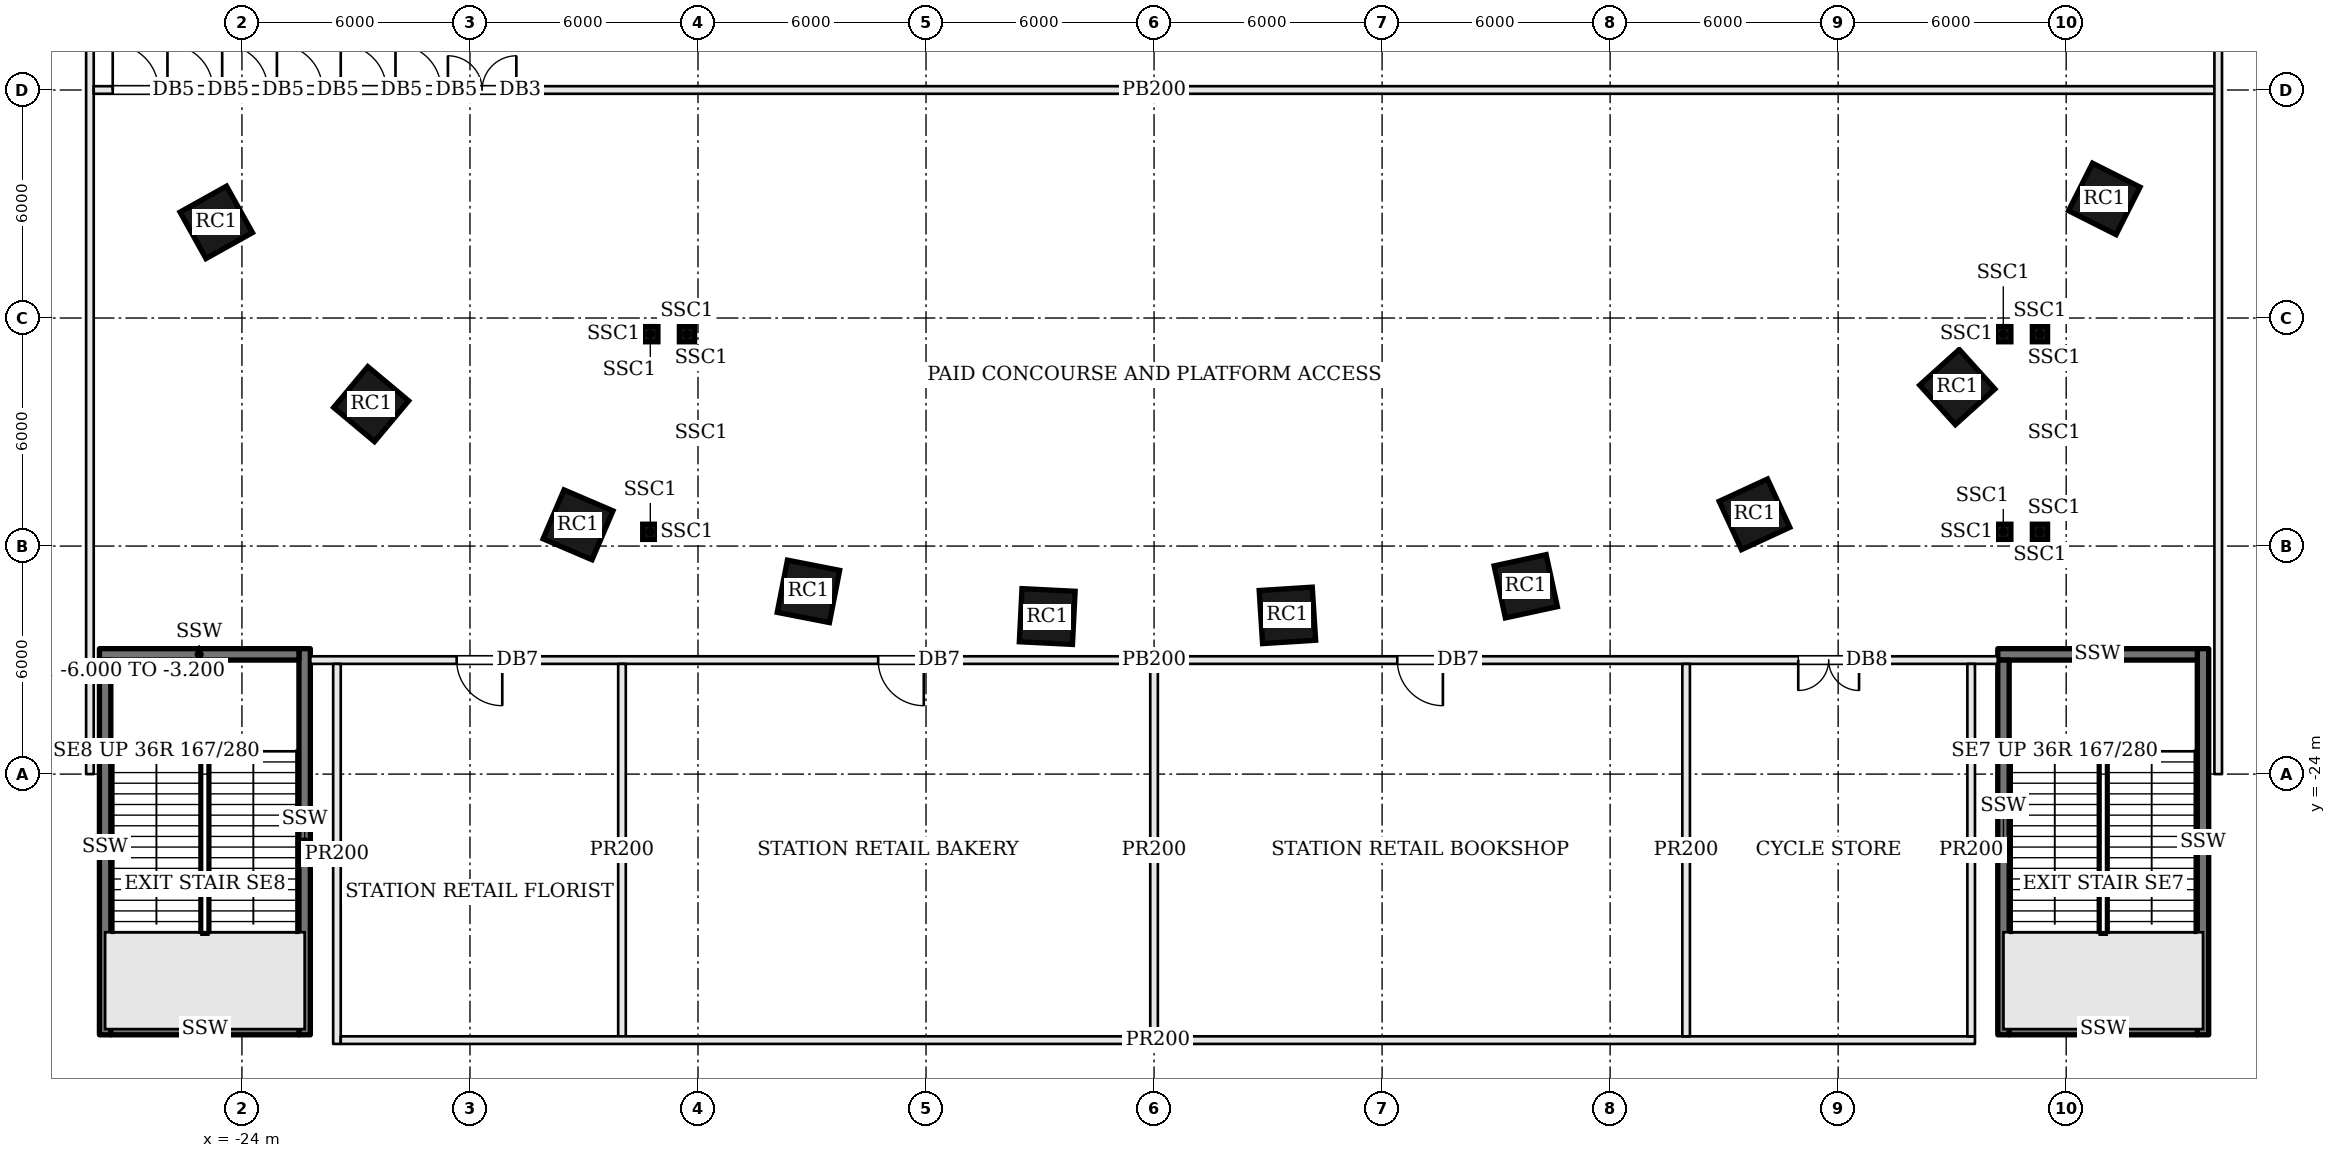
"""IFC4 building model, lengths in metres.
Left out: names, types, materials, properties, quantities, classifications, styles, units other than length and angle.
Written with IfcOpenShell. Run it as: python <this file> out.ifc"""

import sys

from ifc_helpers import new_model, si_unit, direction, frame, frame_2d, origin, origin_2d, place, context, subcontext, project, spatial, rectangle, extrude, element, fill, save


model = new_model("IFC4")
c1 = context("Model", 3, precision=1e-05, world=origin(), true_north=direction((0.0, 1.0)))
c2 = subcontext(c1, "Body", "Model", "MODEL_VIEW")
j1 = project(units=[si_unit("LENGTHUNIT", "METRE"), si_unit("PLANEANGLEUNIT", "RADIAN")], contexts=[c1])
p1 = place(None, origin())
s1 = spatial("IfcSite", under=j1, at=p1, CompositionType="ELEMENT")
p2 = place(p1, origin())
s2 = spatial("IfcBuilding", under=s1, at=p2, CompositionType="ELEMENT")
p3 = place(p2, frame((0.0, 0.0, -6.0)))
s3 = spatial("IfcBuildingStorey", under=s2, at=p3, CompositionType="ELEMENT", Elevation=-6.0)
for number, where, z_axis, x_axis in (
    (1, (-24.676, -9.483, 0.0), (0.0, 0.0, 1.0), (0.487, -0.873, 0.0)),
    (2, (-20.6, -14.266, 0.0), (0.0, 0.0, 1.0), (0.767, -0.641, 0.0)),
    (3, (-15.157, -17.441, 0.0), (0.0, 0.0, 1.0), (0.919, -0.394, 0.0)),
    (4, (-9.094, -19.192, 0.0), (0.0, 0.0, 1.0), (0.981, -0.192, 0.0)),
    (5, (-2.811, -19.854, 0.0), (0.0, 0.0, 1.0), (0.999, -0.05, 0.0)),
    (6, (3.509, -19.824, 0.0), (0.0, 0.0, 1.0), (0.998, 0.063, 0.0)),
    (7, (9.78, -19.058, 0.0), (0.0, 0.0, 1.0), (0.977, 0.211, 0.0)),
    (8, (15.799, -17.165, 0.0), (0.0, 0.0, 1.0), (0.908, 0.419, 0.0)),
    (9, (21.135, -13.817, 0.0), (0.0, 0.0, 1.0), (0.743, 0.67, 0.0)),
    (10, (25.003, -8.866, 0.0), (0.0, 0.0, 1.0), (0.45, 0.893, 0.0)),
):
    element("IfcColumn", number, at=place(p3, frame(where, z_axis=z_axis, x_axis=x_axis)), inside=s3, PredefinedType="COLUMN", context=c2, shape_type="SweptSolid", body=[
        extrude(rectangle(XDim=1.4, YDim=1.4, at=origin_2d()), origin(), (0.0, 0.0, 1.0), 6.0),
    ])
p4 = place(p3, frame((-28.0, -24.0, 0.0), z_axis=(0.0, 0.0, 1.0), x_axis=(0.0, 1.0, 0.0)))
e11 = element("IfcWall", 11, at=p4, inside=s3, PredefinedType="PARTITIONING", context=c2, shape_type="SweptSolid", body=[
    extrude(rectangle(XDim=48.0, YDim=0.2, at=frame_2d((24.0, 0.0))), origin(), (0.0, 0.0, 1.0), 5.148),
])
p5 = place(p4, frame((22.259, 0.0, 0.0)))
e12 = element("IfcOpeningElement", 12, at=p5, cuts=e11, PredefinedType="OPENING", context=c2, shape_type="SweptSolid", body=[
    extrude(rectangle(XDim=1.8, YDim=2.1, at=frame_2d((0.9, 1.05))), frame((0.0, 0.11, 0.0), z_axis=(0.0, -1.0, 0.0), x_axis=(1.0, 0.0, 0.0)), (0.0, 0.0, 1.0), 0.22),
])
p6 = place(p3, frame((-27.9, -6.0, 0.0), z_axis=(0.0, 0.0, 1.0), x_axis=(1.0, 0.0, 0.0)))
e13 = element("IfcWall", 13, at=p6, inside=s3, PredefinedType="PARTITIONING", context=c2, shape_type="SweptSolid", body=[
    extrude(rectangle(XDim=55.8, YDim=0.2, at=frame_2d((27.9, 0.0))), origin(), (0.0, 0.0, 1.0), 5.148),
])
p7 = place(p6, frame((0.5, 0.0, 0.0)))
e14 = element("IfcOpeningElement", 14, at=p7, cuts=e13, PredefinedType="OPENING", context=c2, shape_type="SweptSolid", body=[
    extrude(rectangle(XDim=1.2, YDim=2.1, at=frame_2d((0.6, 1.05))), frame((0.0, 0.11, 0.0), z_axis=(0.0, -1.0, 0.0), x_axis=(1.0, 0.0, 0.0)), (0.0, 0.0, 1.0), 0.22),
])
p8 = place(p6, frame((1.94, 0.0, 0.0)))
e15 = element("IfcOpeningElement", 15, at=p8, cuts=e13, PredefinedType="OPENING", context=c2, shape_type="SweptSolid", body=[
    extrude(rectangle(XDim=1.2, YDim=2.1, at=frame_2d((0.6, 1.05))), frame((0.0, 0.11, 0.0), z_axis=(0.0, -1.0, 0.0), x_axis=(1.0, 0.0, 0.0)), (0.0, 0.0, 1.0), 0.22),
])
p9 = place(p6, frame((3.38, 0.0, 0.0)))
e16 = element("IfcOpeningElement", 16, at=p9, cuts=e13, PredefinedType="OPENING", context=c2, shape_type="SweptSolid", body=[
    extrude(rectangle(XDim=1.2, YDim=2.1, at=frame_2d((0.6, 1.05))), frame((0.0, 0.11, 0.0), z_axis=(0.0, -1.0, 0.0), x_axis=(1.0, 0.0, 0.0)), (0.0, 0.0, 1.0), 0.22),
])
p10 = place(p6, frame((4.82, 0.0, 0.0)))
e17 = element("IfcOpeningElement", 17, at=p10, cuts=e13, PredefinedType="OPENING", context=c2, shape_type="SweptSolid", body=[
    extrude(rectangle(XDim=1.2, YDim=2.1, at=frame_2d((0.6, 1.05))), frame((0.0, 0.11, 0.0), z_axis=(0.0, -1.0, 0.0), x_axis=(1.0, 0.0, 0.0)), (0.0, 0.0, 1.0), 0.22),
])
p11 = place(p6, frame((6.5, 0.0, 0.0)))
e18 = element("IfcOpeningElement", 18, at=p11, cuts=e13, PredefinedType="OPENING", context=c2, shape_type="SweptSolid", body=[
    extrude(rectangle(XDim=1.2, YDim=2.1, at=frame_2d((0.6, 1.05))), frame((0.0, 0.11, 0.0), z_axis=(0.0, -1.0, 0.0), x_axis=(1.0, 0.0, 0.0)), (0.0, 0.0, 1.0), 0.22),
])
p12 = place(p6, frame((7.94, 0.0, 0.0)))
e19 = element("IfcOpeningElement", 19, at=p12, cuts=e13, PredefinedType="OPENING", context=c2, shape_type="SweptSolid", body=[
    extrude(rectangle(XDim=1.2, YDim=2.1, at=frame_2d((0.6, 1.05))), frame((0.0, 0.11, 0.0), z_axis=(0.0, -1.0, 0.0), x_axis=(1.0, 0.0, 0.0)), (0.0, 0.0, 1.0), 0.22),
])
p13 = place(p6, frame((9.32, 0.0, 0.0)))
e20 = element("IfcOpeningElement", 20, at=p13, cuts=e13, PredefinedType="OPENING", context=c2, shape_type="SweptSolid", body=[
    extrude(rectangle(XDim=1.8, YDim=2.1, at=frame_2d((0.9, 1.05))), frame((0.0, 0.11, 0.0), z_axis=(0.0, -1.0, 0.0), x_axis=(1.0, 0.0, 0.0)), (0.0, 0.0, 1.0), 0.22),
])
p14 = place(p3, frame((28.0, 24.0, 0.0), z_axis=(0.0, 0.0, 1.0), x_axis=(0.0, -1.0, 0.0)))
e21 = element("IfcWall", 21, at=p14, inside=s3, PredefinedType="PARTITIONING", context=c2, shape_type="SweptSolid", body=[
    extrude(rectangle(XDim=48.0, YDim=0.2, at=frame_2d((24.0, 0.0))), origin(), (0.0, 0.0, 1.0), 5.148),
])
p15 = place(p14, frame((23.063, 0.0, 0.0)))
e22 = element("IfcOpeningElement", 22, at=p15, cuts=e21, PredefinedType="OPENING", context=c2, shape_type="SweptSolid", body=[
    extrude(rectangle(XDim=1.8, YDim=2.1, at=frame_2d((0.9, 1.05))), frame((0.0, 0.11, 0.0), z_axis=(0.0, -1.0, 0.0), x_axis=(1.0, 0.0, 0.0)), (0.0, 0.0, 1.0), 0.22),
])
p16 = place(p3, frame((27.6, -30.86, 0.0), z_axis=(0.0, 0.0, 1.0), x_axis=(0.0, 1.0, 0.0)))
e23 = element("IfcWall", 23, at=p16, inside=s3, PredefinedType="SOLIDWALL", context=c2, shape_type="SweptSolid", body=[
    extrude(rectangle(XDim=10.16, YDim=0.3, at=frame_2d((5.08, 0.0))), origin(), (0.0, 0.0, 1.0), 5.65),
])
p17 = place(p3, frame((27.45, -20.85, 0.0), z_axis=(0.0, 0.0, 1.0), x_axis=(-1.0, 0.0, 0.0)))
e24 = element("IfcWall", 24, at=p17, inside=s3, PredefinedType="SOLIDWALL", context=c2, shape_type="SweptSolid", body=[
    extrude(rectangle(XDim=5.25, YDim=0.3, at=frame_2d((2.625, 0.0))), origin(), (0.0, 0.0, 1.0), 5.65),
])
p18 = place(p3, frame((22.35, -21.0, 0.0), z_axis=(0.0, 0.0, 1.0), x_axis=(0.0, -1.0, 0.0)))
e25 = element("IfcWall", 25, at=p18, inside=s3, PredefinedType="SOLIDWALL", context=c2, shape_type="SweptSolid", body=[
    extrude(rectangle(XDim=9.86, YDim=0.3, at=frame_2d((4.93, 0.0))), origin(), (0.0, 0.0, 1.0), 5.65),
])
p19 = place(p3, frame((22.2, -21.0, 0.0), z_axis=(0.0, 0.0, 1.0), x_axis=(-1.0, 0.0, 0.0)))
e26 = element("IfcWall", 26, at=p19, inside=s3, PredefinedType="PARTITIONING", context=c2, shape_type="SweptSolid", body=[
    extrude(rectangle(XDim=44.4, YDim=0.2, at=frame_2d((22.2, 0.0))), origin(), (0.0, 0.0, 1.0), 5.148),
])
p20 = place(p19, frame((39.35, 0.0, 0.0)))
e27 = element("IfcOpeningElement", 27, at=p20, cuts=e26, PredefinedType="OPENING", context=c2, shape_type="SweptSolid", body=[
    extrude(rectangle(XDim=1.2, YDim=2.1, at=frame_2d((0.6, 1.05))), frame((0.0, 0.11, 0.0), z_axis=(0.0, -1.0, 0.0), x_axis=(1.0, 0.0, 0.0)), (0.0, 0.0, 1.0), 0.22),
])
p21 = place(p19, frame((28.259, 0.0, 0.0)))
e28 = element("IfcOpeningElement", 28, at=p21, cuts=e26, PredefinedType="OPENING", context=c2, shape_type="SweptSolid", body=[
    extrude(rectangle(XDim=1.2, YDim=2.1, at=frame_2d((0.6, 1.05))), frame((0.0, 0.11, 0.0), z_axis=(0.0, -1.0, 0.0), x_axis=(1.0, 0.0, 0.0)), (0.0, 0.0, 1.0), 0.22),
])
p22 = place(p19, frame((14.6, 0.0, 0.0)))
e29 = element("IfcOpeningElement", 29, at=p22, cuts=e26, PredefinedType="OPENING", context=c2, shape_type="SweptSolid", body=[
    extrude(rectangle(XDim=1.2, YDim=2.1, at=frame_2d((0.6, 1.05))), frame((0.0, 0.11, 0.0), z_axis=(0.0, -1.0, 0.0), x_axis=(1.0, 0.0, 0.0)), (0.0, 0.0, 1.0), 0.22),
])
p23 = place(p19, frame((3.65, 0.0, 0.0)))
e30 = element("IfcOpeningElement", 30, at=p23, cuts=e26, PredefinedType="OPENING", context=c2, shape_type="SweptSolid", body=[
    extrude(rectangle(XDim=1.6, YDim=2.4, at=frame_2d((0.8, 1.2))), frame((0.0, 0.11, 0.0), z_axis=(0.0, -1.0, 0.0), x_axis=(1.0, 0.0, 0.0)), (0.0, 0.0, 1.0), 0.22),
])
p24 = place(p3, frame((-22.35, -30.86, 0.0), z_axis=(0.0, 0.0, 1.0), x_axis=(0.0, 1.0, 0.0)))
e31 = element("IfcWall", 31, at=p24, inside=s3, PredefinedType="SOLIDWALL", context=c2, shape_type="SweptSolid", body=[
    extrude(rectangle(XDim=10.16, YDim=0.3, at=frame_2d((5.08, 0.0))), origin(), (0.0, 0.0, 1.0), 5.65),
])
p25 = place(p3, frame((-22.5, -20.85, 0.0), z_axis=(0.0, 0.0, 1.0), x_axis=(-1.0, 0.0, 0.0)))
e32 = element("IfcWall", 32, at=p25, inside=s3, PredefinedType="SOLIDWALL", context=c2, shape_type="SweptSolid", body=[
    extrude(rectangle(XDim=5.25, YDim=0.3, at=frame_2d((2.625, 0.0))), origin(), (0.0, 0.0, 1.0), 5.65),
])
p26 = place(p3, frame((-27.6, -21.0, 0.0), z_axis=(0.0, 0.0, 1.0), x_axis=(0.0, -1.0, 0.0)))
e33 = element("IfcWall", 33, at=p26, inside=s3, PredefinedType="SOLIDWALL", context=c2, shape_type="SweptSolid", body=[
    extrude(rectangle(XDim=9.86, YDim=0.3, at=frame_2d((4.93, 0.0))), origin(), (0.0, 0.0, 1.0), 5.65),
])
for number, where, z_axis, x_axis in (
    (34, (27.45, -30.71, 0.0), (0.0, 0.0, 1.0), (-1.0, 0.0, 0.0)),
    (35, (-22.5, -30.71, 0.0), (0.0, 0.0, 1.0), (-1.0, 0.0, 0.0)),
):
    element("IfcWall", number, at=place(p3, frame(where, z_axis=z_axis, x_axis=x_axis)), inside=s3, PredefinedType="SOLIDWALL", context=c2, shape_type="SweptSolid", body=[
        extrude(rectangle(XDim=4.95, YDim=0.3, at=frame_2d((2.475, 0.0))), origin(), (0.0, 0.0, 1.0), 5.65),
    ])
p27 = place(p3, frame((-21.5, -31.1, 0.0), z_axis=(0.0, 0.0, 1.0), x_axis=(0.0, 1.0, 0.0)))
e36 = element("IfcWall", 36, at=p27, inside=s3, PredefinedType="PARTITIONING", context=c2, shape_type="SweptSolid", body=[
    extrude(rectangle(XDim=10.0, YDim=0.2, at=frame_2d((5.0, 0.0))), origin(), (0.0, 0.0, 1.0), 5.134),
])
p28 = place(p3, frame((-14.0, -21.1, 0.0), z_axis=(0.0, 0.0, 1.0), x_axis=(0.0, -1.0, 0.0)))
e37 = element("IfcWall", 37, at=p28, inside=s3, PredefinedType="PARTITIONING", context=c2, shape_type="SweptSolid", body=[
    extrude(rectangle(XDim=9.8, YDim=0.2, at=frame_2d((4.9, 0.0))), origin(), (0.0, 0.0, 1.0), 5.134),
])
p29 = place(p3, frame((21.6, -31.0, 0.0), z_axis=(0.0, 0.0, 1.0), x_axis=(-1.0, 0.0, 0.0)))
e38 = element("IfcWall", 38, at=p29, inside=s3, PredefinedType="PARTITIONING", context=c2, shape_type="SweptSolid", body=[
    extrude(rectangle(XDim=43.0, YDim=0.2, at=frame_2d((21.5, 0.0))), origin(), (0.0, 0.0, 1.0), 5.134),
])
for number, where, z_axis, x_axis in (
    (39, (0.0, -21.1, 0.0), (0.0, 0.0, 1.0), (0.0, -1.0, 0.0)),
    (40, (14.0, -21.1, 0.0), (0.0, 0.0, 1.0), (0.0, -1.0, 0.0)),
    (41, (21.5, -21.1, 0.0), (0.0, 0.0, 1.0), (0.0, -1.0, 0.0)),
):
    element("IfcWall", number, at=place(p3, frame(where, z_axis=z_axis, x_axis=x_axis)), inside=s3, PredefinedType="PARTITIONING", context=c2, shape_type="SweptSolid", body=[
        extrude(rectangle(XDim=9.8, YDim=0.2, at=frame_2d((4.9, 0.0))), origin(), (0.0, 0.0, 1.0), 5.134),
    ])
for number, where, z_axis, x_axis in (
    (42, (-11.915, -13.05, 0.0), (0.0, 0.0, 1.0), (1.0, 0.0, 0.0)),
    (43, (-11.915, -15.025, 0.0), (0.0, 0.0, 1.0), (1.0, 0.0, 0.0)),
    (44, (-12.29, -17.625, 0.0), (0.0, 0.0, 1.0), (1.0, 0.0, 0.0)),
    (45, (-13.255, -17.625, 0.0), (0.0, 0.0, 1.0), (1.0, 0.0, 0.0)),
    (46, (-14.22, -12.425, 0.0), (0.0, 0.0, 1.0), (1.0, 0.0, 0.0)),
    (47, (-12.29, -12.425, 0.0), (0.0, 0.0, 1.0), (1.0, 0.0, 0.0)),
    (48, (-13.255, -12.425, 0.0), (0.0, 0.0, 1.0), (1.0, 0.0, 0.0)),
    (49, (23.685, -17.0, 0.0), (0.0, 0.0, 1.0), (1.0, 0.0, 0.0)),
    (50, (23.685, -13.05, 0.0), (0.0, 0.0, 1.0), (1.0, 0.0, 0.0)),
    (51, (23.685, -15.025, 0.0), (0.0, 0.0, 1.0), (1.0, 0.0, 0.0)),
    (52, (21.38, -17.625, 0.0), (0.0, 0.0, 1.0), (1.0, 0.0, 0.0)),
    (53, (23.31, -17.625, 0.0), (0.0, 0.0, 1.0), (1.0, 0.0, 0.0)),
    (54, (22.345, -17.625, 0.0), (0.0, 0.0, 1.0), (1.0, 0.0, 0.0)),
    (55, (21.38, -12.425, 0.0), (0.0, 0.0, 1.0), (1.0, 0.0, 0.0)),
    (56, (23.31, -12.425, 0.0), (0.0, 0.0, 1.0), (1.0, 0.0, 0.0)),
    (57, (22.345, -12.425, 0.0), (0.0, 0.0, 1.0), (1.0, 0.0, 0.0)),
):
    element("IfcColumn", number, at=place(p3, frame(where, z_axis=z_axis, x_axis=x_axis)), inside=s3, PredefinedType="COLUMN", context=c2, shape_type="SweptSolid", body=[
        extrude(rectangle(XDim=0.4, YDim=0.4, at=origin_2d()), origin(), (0.0, 0.0, 1.0), 5.65),
    ])
p30 = place(p20, origin())
e58 = element("IfcDoor", 58, at=p30, inside=s3, OperationType="SINGLE_SWING_LEFT", PredefinedType="DOOR", context=c2, shape_type="SweptSolid", body=[
    extrude(rectangle(XDim=1.2, YDim=2.1, at=frame_2d((0.6, 1.05))), frame((0.0, 0.025, 0.0), z_axis=(0.0, -1.0, 0.0), x_axis=(1.0, 0.0, 0.0)), (0.0, 0.0, 1.0), 0.05),
])
fill(e27, e58)
p31 = place(p21, origin())
e59 = element("IfcDoor", 59, at=p31, inside=s3, OperationType="SINGLE_SWING_LEFT", PredefinedType="DOOR", context=c2, shape_type="SweptSolid", body=[
    extrude(rectangle(XDim=1.2, YDim=2.1, at=frame_2d((0.6, 1.05))), frame((0.0, 0.025, 0.0), z_axis=(0.0, -1.0, 0.0), x_axis=(1.0, 0.0, 0.0)), (0.0, 0.0, 1.0), 0.05),
])
fill(e28, e59)
p32 = place(p22, origin())
e60 = element("IfcDoor", 60, at=p32, inside=s3, OperationType="SINGLE_SWING_LEFT", PredefinedType="DOOR", context=c2, shape_type="SweptSolid", body=[
    extrude(rectangle(XDim=1.2, YDim=2.1, at=frame_2d((0.6, 1.05))), frame((0.0, 0.025, 0.0), z_axis=(0.0, -1.0, 0.0), x_axis=(1.0, 0.0, 0.0)), (0.0, 0.0, 1.0), 0.05),
])
fill(e29, e60)
p33 = place(p23, origin())
e61 = element("IfcDoor", 61, at=p33, inside=s3, OperationType="DOUBLE_DOOR_SINGLE_SWING", PredefinedType="DOOR", context=c2, shape_type="SweptSolid", body=[
    extrude(rectangle(XDim=1.6, YDim=2.4, at=frame_2d((0.8, 1.2))), frame((0.0, 0.025, 0.0), z_axis=(0.0, -1.0, 0.0), x_axis=(1.0, 0.0, 0.0)), (0.0, 0.0, 1.0), 0.05),
])
fill(e30, e61)
p34 = place(p7, origin())
e62 = element("IfcDoor", 62, at=p34, inside=s3, OperationType="SINGLE_SWING_LEFT", PredefinedType="GATE", context=c2, shape_type="SweptSolid", body=[
    extrude(rectangle(XDim=1.2, YDim=2.1, at=frame_2d((0.6, 1.05))), frame((0.0, 0.025, 0.0), z_axis=(0.0, -1.0, 0.0), x_axis=(1.0, 0.0, 0.0)), (0.0, 0.0, 1.0), 0.05),
])
fill(e14, e62)
p35 = place(p8, origin())
e63 = element("IfcDoor", 63, at=p35, inside=s3, OperationType="SINGLE_SWING_LEFT", PredefinedType="GATE", context=c2, shape_type="SweptSolid", body=[
    extrude(rectangle(XDim=1.2, YDim=2.1, at=frame_2d((0.6, 1.05))), frame((0.0, 0.025, 0.0), z_axis=(0.0, -1.0, 0.0), x_axis=(1.0, 0.0, 0.0)), (0.0, 0.0, 1.0), 0.05),
])
fill(e15, e63)
p36 = place(p9, origin())
e64 = element("IfcDoor", 64, at=p36, inside=s3, OperationType="SINGLE_SWING_LEFT", PredefinedType="GATE", context=c2, shape_type="SweptSolid", body=[
    extrude(rectangle(XDim=1.2, YDim=2.1, at=frame_2d((0.6, 1.05))), frame((0.0, 0.025, 0.0), z_axis=(0.0, -1.0, 0.0), x_axis=(1.0, 0.0, 0.0)), (0.0, 0.0, 1.0), 0.05),
])
fill(e16, e64)
p37 = place(p10, origin())
e65 = element("IfcDoor", 65, at=p37, inside=s3, OperationType="SINGLE_SWING_LEFT", PredefinedType="GATE", context=c2, shape_type="SweptSolid", body=[
    extrude(rectangle(XDim=1.2, YDim=2.1, at=frame_2d((0.6, 1.05))), frame((0.0, 0.025, 0.0), z_axis=(0.0, -1.0, 0.0), x_axis=(1.0, 0.0, 0.0)), (0.0, 0.0, 1.0), 0.05),
])
fill(e17, e65)
p38 = place(p11, origin())
e66 = element("IfcDoor", 66, at=p38, inside=s3, OperationType="SINGLE_SWING_LEFT", PredefinedType="GATE", context=c2, shape_type="SweptSolid", body=[
    extrude(rectangle(XDim=1.2, YDim=2.1, at=frame_2d((0.6, 1.05))), frame((0.0, 0.025, 0.0), z_axis=(0.0, -1.0, 0.0), x_axis=(1.0, 0.0, 0.0)), (0.0, 0.0, 1.0), 0.05),
])
fill(e18, e66)
p39 = place(p12, origin())
e67 = element("IfcDoor", 67, at=p39, inside=s3, OperationType="SINGLE_SWING_LEFT", PredefinedType="GATE", context=c2, shape_type="SweptSolid", body=[
    extrude(rectangle(XDim=1.2, YDim=2.1, at=frame_2d((0.6, 1.05))), frame((0.0, 0.025, 0.0), z_axis=(0.0, -1.0, 0.0), x_axis=(1.0, 0.0, 0.0)), (0.0, 0.0, 1.0), 0.05),
])
fill(e19, e67)
p40 = place(p13, origin())
e68 = element("IfcDoor", 68, at=p40, inside=s3, OperationType="DOUBLE_DOOR_SINGLE_SWING", PredefinedType="DOOR", context=c2, shape_type="SweptSolid", body=[
    extrude(rectangle(XDim=1.8, YDim=2.1, at=frame_2d((0.9, 1.05))), frame((0.0, 0.025, 0.0), z_axis=(0.0, -1.0, 0.0), x_axis=(1.0, 0.0, 0.0)), (0.0, 0.0, 1.0), 0.05),
])
fill(e20, e68)
save(model, sys.argv[1])
